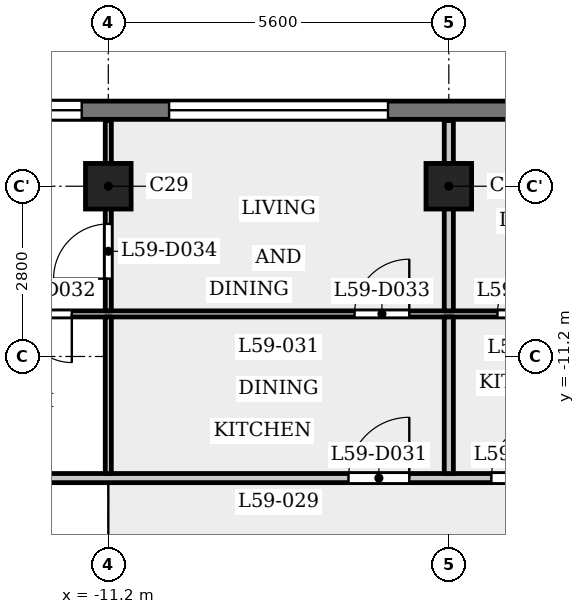
"""IFC4 building model, lengths in metres.
Left out: names, types, materials, properties, quantities, classifications, styles, units other than length and angle.
Written with IfcOpenShell. Run it as: python <this file> out.ifc"""

import sys

from ifc_helpers import new_model, si_unit, direction, frame, frame_2d, origin, origin_2d, place, context, subcontext, project, spatial, rectangle, extrude, element, fill, save


model = new_model("IFC4")
c1 = context("Model", 3, precision=1e-05, world=origin(), true_north=direction((0.0, 1.0)))
c2 = subcontext(c1, "Body", "Model", "MODEL_VIEW")
j1 = project(units=[si_unit("LENGTHUNIT", "METRE"), si_unit("PLANEANGLEUNIT", "RADIAN")], contexts=[c1])
p1 = place(None, origin())
s1 = spatial("IfcSite", under=j1, at=p1, CompositionType="ELEMENT")
p2 = place(p1, origin())
s2 = spatial("IfcBuilding", under=s1, at=p2, CompositionType="ELEMENT")
p3 = place(p2, frame((0.0, 0.0, 227.4)))
s3 = spatial("IfcBuildingStorey", under=s2, at=p3, CompositionType="ELEMENT", Elevation=227.4)
for number, where, z_axis, x_axis in (
    (1, (-11.2, -8.4, 0.0), (0.0, 0.0, 1.0), (1.0, 0.0, 0.0)),
    (2, (-5.6, -8.4, 0.0), (0.0, 0.0, 1.0), (1.0, 0.0, 0.0)),
):
    element("IfcColumn", number, at=place(p3, frame(where, z_axis=z_axis, x_axis=x_axis)), inside=s3, PredefinedType="COLUMN", context=c2, shape_type="SweptSolid", body=[
        extrude(rectangle(XDim=0.75, YDim=0.75, at=origin_2d()), origin(), (0.0, 0.0, 1.0), 3.5),
    ])
p4 = place(p3, frame((13.8, -7.15, 0.0), z_axis=(0.0, 0.0, 1.0), x_axis=(-1.0, 0.0, 0.0)))
e3 = element("IfcWall", 3, at=p4, inside=s3, PredefinedType="SOLIDWALL", context=c2, shape_type="SweptSolid", body=[
    extrude(rectangle(XDim=27.6, YDim=0.3, at=frame_2d((13.8, 0.0))), origin(), (0.0, 0.0, 1.0), 3.15),
])
p5 = place(p4, frame((0.363, 0.0, 0.9)))
e4 = element("IfcOpeningElement", 4, at=p5, cuts=e3, PredefinedType="OPENING", context=c2, shape_type="SweptSolid", body=[
    extrude(rectangle(XDim=1.8, YDim=1.25, at=frame_2d((0.9, 0.625))), frame((0.0, 0.16, 0.0), z_axis=(0.0, -1.0, 0.0), x_axis=(1.0, 0.0, 0.0)), (0.0, 0.0, 1.0), 0.32),
])
p6 = place(p4, frame((3.6, 0.0, 1.2)))
e5 = element("IfcOpeningElement", 5, at=p6, cuts=e3, PredefinedType="OPENING", context=c2, shape_type="SweptSolid", body=[
    extrude(rectangle(XDim=3.6, YDim=0.95, at=frame_2d((1.8, 0.475))), frame((0.0, 0.16, 0.0), z_axis=(0.0, -1.0, 0.0), x_axis=(1.0, 0.0, 0.0)), (0.0, 0.0, 1.0), 0.32),
])
p7 = place(p4, frame((9.2, 0.0, 1.2)))
e6 = element("IfcOpeningElement", 6, at=p7, cuts=e3, PredefinedType="OPENING", context=c2, shape_type="SweptSolid", body=[
    extrude(rectangle(XDim=3.6, YDim=0.95, at=frame_2d((1.8, 0.475))), frame((0.0, 0.16, 0.0), z_axis=(0.0, -1.0, 0.0), x_axis=(1.0, 0.0, 0.0)), (0.0, 0.0, 1.0), 0.32),
])
p8 = place(p4, frame((14.8, 0.0, 1.2)))
e7 = element("IfcOpeningElement", 7, at=p8, cuts=e3, PredefinedType="OPENING", context=c2, shape_type="SweptSolid", body=[
    extrude(rectangle(XDim=3.6, YDim=0.95, at=frame_2d((1.8, 0.475))), frame((0.0, 0.16, 0.0), z_axis=(0.0, -1.0, 0.0), x_axis=(1.0, 0.0, 0.0)), (0.0, 0.0, 1.0), 0.32),
])
p9 = place(p4, frame((20.4, 0.0, 1.2)))
e8 = element("IfcOpeningElement", 8, at=p9, cuts=e3, PredefinedType="OPENING", context=c2, shape_type="SweptSolid", body=[
    extrude(rectangle(XDim=3.6, YDim=0.95, at=frame_2d((1.8, 0.475))), frame((0.0, 0.16, 0.0), z_axis=(0.0, -1.0, 0.0), x_axis=(1.0, 0.0, 0.0)), (0.0, 0.0, 1.0), 0.32),
])
p10 = place(p4, frame((25.438, 0.0, 0.9)))
e9 = element("IfcOpeningElement", 9, at=p10, cuts=e3, PredefinedType="OPENING", context=c2, shape_type="SweptSolid", body=[
    extrude(rectangle(XDim=1.8, YDim=1.25, at=frame_2d((0.9, 0.625))), frame((0.0, 0.16, 0.0), z_axis=(0.0, -1.0, 0.0), x_axis=(1.0, 0.0, 0.0)), (0.0, 0.0, 1.0), 0.32),
])
p11 = place(p3, frame((-17.4, -13.2, 0.0), z_axis=(0.0, 0.0, 1.0), x_axis=(1.0, 0.0, 0.0)))
e10 = element("IfcWall", 10, at=p11, inside=s3, PredefinedType="PARTITIONING", context=c2, shape_type="SweptSolid", body=[
    extrude(rectangle(XDim=34.8, YDim=0.15, at=frame_2d((17.4, 0.0))), origin(), (0.0, 0.0, 1.0), 3.15),
])
p12 = place(p11, frame((0.65, 0.0, 0.0)))
e11 = element("IfcOpeningElement", 11, at=p12, cuts=e10, PredefinedType="OPENING", context=c2, shape_type="SweptSolid", body=[
    extrude(rectangle(XDim=1.0, YDim=2.1, at=frame_2d((0.5, 1.05))), frame((0.0, 0.085, 0.0), z_axis=(0.0, -1.0, 0.0), x_axis=(1.0, 0.0, 0.0)), (0.0, 0.0, 1.0), 0.17),
])
p13 = place(p11, frame((33.05, 0.0, 0.0)))
e12 = element("IfcOpeningElement", 12, at=p13, cuts=e10, PredefinedType="OPENING", context=c2, shape_type="SweptSolid", body=[
    extrude(rectangle(XDim=1.0, YDim=2.1, at=frame_2d((0.5, 1.05))), frame((0.0, 0.085, 0.0), z_axis=(0.0, -1.0, 0.0), x_axis=(1.0, 0.0, 0.0)), (0.0, 0.0, 1.0), 0.17),
])
p14 = place(p11, frame((10.15, 0.0, 0.0)))
e13 = element("IfcOpeningElement", 13, at=p14, cuts=e10, PredefinedType="OPENING", context=c2, shape_type="SweptSolid", body=[
    extrude(rectangle(XDim=1.0, YDim=2.1, at=frame_2d((0.5, 1.05))), frame((0.0, 0.085, 0.0), z_axis=(0.0, -1.0, 0.0), x_axis=(1.0, 0.0, 0.0)), (0.0, 0.0, 1.0), 0.17),
])
p15 = place(p11, frame((12.5, 0.0, 0.0)))
e14 = element("IfcOpeningElement", 14, at=p15, cuts=e10, PredefinedType="OPENING", context=c2, shape_type="SweptSolid", body=[
    extrude(rectangle(XDim=1.0, YDim=2.1, at=frame_2d((0.5, 1.05))), frame((0.0, 0.085, 0.0), z_axis=(0.0, -1.0, 0.0), x_axis=(1.0, 0.0, 0.0)), (0.0, 0.0, 1.0), 0.17),
])
p16 = place(p11, frame((18.0, 0.0, 0.0)))
e15 = element("IfcOpeningElement", 15, at=p16, cuts=e10, PredefinedType="OPENING", context=c2, shape_type="SweptSolid", body=[
    extrude(rectangle(XDim=1.0, YDim=2.1, at=frame_2d((0.5, 1.05))), frame((0.0, 0.085, 0.0), z_axis=(0.0, -1.0, 0.0), x_axis=(1.0, 0.0, 0.0)), (0.0, 0.0, 1.0), 0.17),
])
p17 = place(p11, frame((30.75, 0.0, 0.0)))
e16 = element("IfcOpeningElement", 16, at=p17, cuts=e10, PredefinedType="OPENING", context=c2, shape_type="SweptSolid", body=[
    extrude(rectangle(XDim=1.0, YDim=2.1, at=frame_2d((0.5, 1.05))), frame((0.0, 0.085, 0.0), z_axis=(0.0, -1.0, 0.0), x_axis=(1.0, 0.0, 0.0)), (0.0, 0.0, 1.0), 0.17),
])
p18 = place(p3, frame((-14.925, -10.5, 0.0), z_axis=(0.0, 0.0, 1.0), x_axis=(1.0, 0.0, 0.0)))
e17 = element("IfcWall", 17, at=p18, inside=s3, PredefinedType="PARTITIONING", context=c2, shape_type="SweptSolid", body=[
    extrude(rectangle(XDim=29.85, YDim=0.1, at=frame_2d((14.925, 0.0))), origin(), (0.0, 0.0, 1.0), 3.15),
])
p19 = place(p18, frame((2.325, 0.0, 0.0)))
e18 = element("IfcOpeningElement", 18, at=p19, cuts=e17, PredefinedType="OPENING", context=c2, shape_type="SweptSolid", body=[
    extrude(rectangle(XDim=0.8, YDim=2.1, at=frame_2d((0.4, 1.05))), frame((0.0, 0.06, 0.0), z_axis=(0.0, -1.0, 0.0), x_axis=(1.0, 0.0, 0.0)), (0.0, 0.0, 1.0), 0.12),
])
p20 = place(p18, frame((7.775, 0.0, 0.0)))
e19 = element("IfcOpeningElement", 19, at=p20, cuts=e17, PredefinedType="OPENING", context=c2, shape_type="SweptSolid", body=[
    extrude(rectangle(XDim=0.9, YDim=2.1, at=frame_2d((0.45, 1.05))), frame((0.0, 0.06, 0.0), z_axis=(0.0, -1.0, 0.0), x_axis=(1.0, 0.0, 0.0)), (0.0, 0.0, 1.0), 0.12),
])
p21 = place(p18, frame((13.575, 0.0, 0.0)))
e20 = element("IfcOpeningElement", 20, at=p21, cuts=e17, PredefinedType="OPENING", context=c2, shape_type="SweptSolid", body=[
    extrude(rectangle(XDim=0.8, YDim=2.1, at=frame_2d((0.4, 1.05))), frame((0.0, 0.06, 0.0), z_axis=(0.0, -1.0, 0.0), x_axis=(1.0, 0.0, 0.0)), (0.0, 0.0, 1.0), 0.12),
])
p22 = place(p18, frame((10.125, 0.0, 0.0)))
e21 = element("IfcOpeningElement", 21, at=p22, cuts=e17, PredefinedType="OPENING", context=c2, shape_type="SweptSolid", body=[
    extrude(rectangle(XDim=0.9, YDim=2.1, at=frame_2d((0.45, 1.05))), frame((0.0, 0.06, 0.0), z_axis=(0.0, -1.0, 0.0), x_axis=(1.0, 0.0, 0.0)), (0.0, 0.0, 1.0), 0.12),
])
p23 = place(p18, frame((18.825, 0.0, 0.0)))
e22 = element("IfcOpeningElement", 22, at=p23, cuts=e17, PredefinedType="OPENING", context=c2, shape_type="SweptSolid", body=[
    extrude(rectangle(XDim=0.8, YDim=2.1, at=frame_2d((0.4, 1.05))), frame((0.0, 0.06, 0.0), z_axis=(0.0, -1.0, 0.0), x_axis=(1.0, 0.0, 0.0)), (0.0, 0.0, 1.0), 0.12),
])
p24 = place(p18, frame((15.625, 0.0, 0.0)))
e23 = element("IfcOpeningElement", 23, at=p24, cuts=e17, PredefinedType="OPENING", context=c2, shape_type="SweptSolid", body=[
    extrude(rectangle(XDim=0.9, YDim=2.1, at=frame_2d((0.45, 1.05))), frame((0.0, 0.06, 0.0), z_axis=(0.0, -1.0, 0.0), x_axis=(1.0, 0.0, 0.0)), (0.0, 0.0, 1.0), 0.12),
])
p25 = place(p18, frame((24.675, 0.0, 0.0)))
e24 = element("IfcOpeningElement", 24, at=p25, cuts=e17, PredefinedType="OPENING", context=c2, shape_type="SweptSolid", body=[
    extrude(rectangle(XDim=0.8, YDim=2.1, at=frame_2d((0.4, 1.05))), frame((0.0, 0.06, 0.0), z_axis=(0.0, -1.0, 0.0), x_axis=(1.0, 0.0, 0.0)), (0.0, 0.0, 1.0), 0.12),
])
p26 = place(p18, frame((28.375, 0.0, 0.0)))
e25 = element("IfcOpeningElement", 25, at=p26, cuts=e17, PredefinedType="OPENING", context=c2, shape_type="SweptSolid", body=[
    extrude(rectangle(XDim=0.9, YDim=2.1, at=frame_2d((0.45, 1.05))), frame((0.0, 0.06, 0.0), z_axis=(0.0, -1.0, 0.0), x_axis=(1.0, 0.0, 0.0)), (0.0, 0.0, 1.0), 0.12),
])
p27 = place(p3, frame((-11.2, -13.125, 0.0), z_axis=(0.0, 0.0, 1.0), x_axis=(0.0, 1.0, 0.0)))
e26 = element("IfcWall", 26, at=p27, inside=s3, PredefinedType="PARTITIONING", context=c2, shape_type="SweptSolid", body=[
    extrude(rectangle(XDim=2.575, YDim=0.1, at=frame_2d((1.288, 0.0))), origin(), (0.0, 0.0, 1.0), 3.15),
])
p28 = place(p3, frame((-11.2, -10.45, 0.0), z_axis=(0.0, 0.0, 1.0), x_axis=(0.0, 1.0, 0.0)))
e27 = element("IfcWall", 27, at=p28, inside=s3, PredefinedType="PARTITIONING", context=c2, shape_type="SweptSolid", body=[
    extrude(rectangle(XDim=3.13, YDim=0.1, at=frame_2d((1.565, 0.0))), origin(), (0.0, 0.0, 1.0), 3.15),
])
p29 = place(p28, frame((0.53, 0.0, 0.0)))
e28 = element("IfcOpeningElement", 28, at=p29, cuts=e27, PredefinedType="OPENING", context=c2, shape_type="SweptSolid", body=[
    extrude(rectangle(XDim=0.9, YDim=2.1, at=frame_2d((0.45, 1.05))), frame((0.0, 0.06, 0.0), z_axis=(0.0, -1.0, 0.0), x_axis=(1.0, 0.0, 0.0)), (0.0, 0.0, 1.0), 0.12),
])
p30 = place(p3, frame((-5.6, -13.125, 0.0), z_axis=(0.0, 0.0, 1.0), x_axis=(0.0, 1.0, 0.0)))
e29 = element("IfcWall", 29, at=p30, inside=s3, PredefinedType="PARTITIONING", context=c2, shape_type="SweptSolid", body=[
    extrude(rectangle(XDim=2.575, YDim=0.15, at=frame_2d((1.288, 0.0))), origin(), (0.0, 0.0, 1.0), 3.15),
])
p31 = place(p3, frame((-5.6, -10.45, 0.0), z_axis=(0.0, 0.0, 1.0), x_axis=(0.0, 1.0, 0.0)))
e30 = element("IfcWall", 30, at=p31, inside=s3, PredefinedType="PARTITIONING", context=c2, shape_type="SweptSolid", body=[
    extrude(rectangle(XDim=3.13, YDim=0.15, at=frame_2d((1.565, 0.0))), origin(), (0.0, 0.0, 1.0), 3.15),
])
p32 = place(p14, origin())
e31 = element("IfcDoor", 31, at=p32, inside=s3, OperationType="SINGLE_SWING_LEFT", PredefinedType="DOOR", context=c2, shape_type="SweptSolid", body=[
    extrude(rectangle(XDim=1.0, YDim=2.1, at=frame_2d((0.5, 1.05))), frame((0.0, 0.025, 0.0), z_axis=(0.0, -1.0, 0.0), x_axis=(1.0, 0.0, 0.0)), (0.0, 0.0, 1.0), 0.05),
])
fill(e13, e31)
p33 = place(p19, origin())
e32 = element("IfcDoor", 32, at=p33, inside=s3, OperationType="SINGLE_SWING_RIGHT", PredefinedType="DOOR", context=c2, shape_type="SweptSolid", body=[
    extrude(rectangle(XDim=0.8, YDim=2.1, at=frame_2d((0.4, 1.05))), frame((0.0, 0.025, 0.0), z_axis=(0.0, -1.0, 0.0), x_axis=(1.0, 0.0, 0.0)), (0.0, 0.0, 1.0), 0.05),
])
fill(e18, e32)
p34 = place(p20, origin())
e33 = element("IfcDoor", 33, at=p34, inside=s3, OperationType="SINGLE_SWING_LEFT", PredefinedType="DOOR", context=c2, shape_type="SweptSolid", body=[
    extrude(rectangle(XDim=0.9, YDim=2.1, at=frame_2d((0.45, 1.05))), frame((0.0, 0.025, 0.0), z_axis=(0.0, -1.0, 0.0), x_axis=(1.0, 0.0, 0.0)), (0.0, 0.0, 1.0), 0.05),
])
fill(e19, e33)
p35 = place(p29, origin())
e34 = element("IfcDoor", 34, at=p35, inside=s3, OperationType="SINGLE_SWING_RIGHT", PredefinedType="DOOR", context=c2, shape_type="SweptSolid", body=[
    extrude(rectangle(XDim=0.9, YDim=2.1, at=frame_2d((0.45, 1.05))), frame((0.0, 0.025, 0.0), z_axis=(0.0, -1.0, 0.0), x_axis=(1.0, 0.0, 0.0)), (0.0, 0.0, 1.0), 0.05),
])
fill(e28, e34)
p36 = place(p15, origin())
e35 = element("IfcDoor", 35, at=p36, inside=s3, OperationType="SINGLE_SWING_LEFT", PredefinedType="DOOR", context=c2, shape_type="SweptSolid", body=[
    extrude(rectangle(XDim=1.0, YDim=2.1, at=frame_2d((0.5, 1.05))), frame((0.0, 0.025, 0.0), z_axis=(0.0, -1.0, 0.0), x_axis=(1.0, 0.0, 0.0)), (0.0, 0.0, 1.0), 0.05),
])
fill(e14, e35)
p37 = place(p22, origin())
e36 = element("IfcDoor", 36, at=p37, inside=s3, OperationType="SINGLE_SWING_LEFT", PredefinedType="DOOR", context=c2, shape_type="SweptSolid", body=[
    extrude(rectangle(XDim=0.9, YDim=2.1, at=frame_2d((0.45, 1.05))), frame((0.0, 0.025, 0.0), z_axis=(0.0, -1.0, 0.0), x_axis=(1.0, 0.0, 0.0)), (0.0, 0.0, 1.0), 0.05),
])
fill(e21, e36)
p38 = place(p9, origin())
e37 = element("IfcWindow", 37, at=p38, inside=s3, PartitioningType="SINGLE_PANEL", PredefinedType="WINDOW", context=c2, shape_type="SweptSolid", body=[
    extrude(rectangle(XDim=3.6, YDim=0.95, at=frame_2d((1.8, 0.475))), frame((0.0, 0.03, 0.0), z_axis=(0.0, -1.0, 0.0), x_axis=(1.0, 0.0, 0.0)), (0.0, 0.0, 1.0), 0.06),
])
fill(e8, e37)
p39 = place(p10, origin())
e38 = element("IfcWindow", 38, at=p39, inside=s3, PartitioningType="SINGLE_PANEL", PredefinedType="WINDOW", context=c2, shape_type="SweptSolid", body=[
    extrude(rectangle(XDim=1.8, YDim=1.25, at=frame_2d((0.9, 0.625))), frame((0.0, 0.03, 0.0), z_axis=(0.0, -1.0, 0.0), x_axis=(1.0, 0.0, 0.0)), (0.0, 0.0, 1.0), 0.06),
])
fill(e9, e38)
save(model, sys.argv[1])
